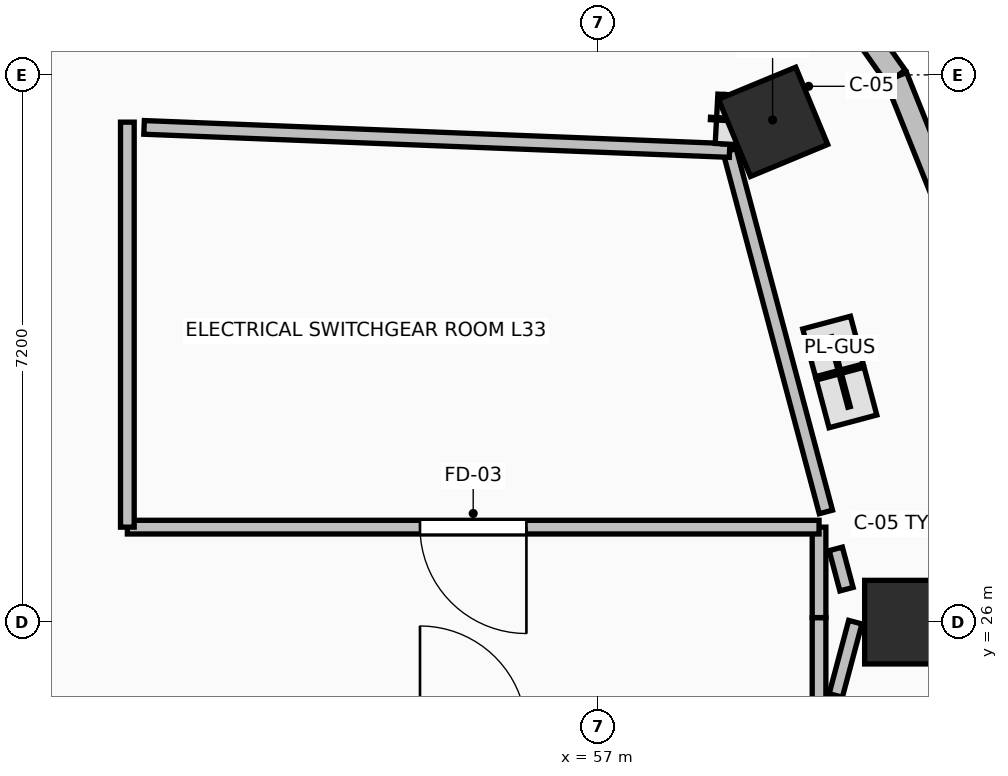
"""IFC4 building model, lengths in metres.
Left out: names, types, materials, properties, quantities, classifications, styles, units other than length and angle.
Written with IfcOpenShell. Run it as: python <this file> out.ifc"""

import sys

from ifc_helpers import new_model, si_unit, direction, frame, frame_2d, origin, origin_2d, place, context, subcontext, project, spatial, rectangle, extrude, element, fill, save


model = new_model("IFC4")
c1 = context("Model", 3, precision=1e-05, world=origin(), true_north=direction((0.0, 1.0)))
c2 = subcontext(c1, "Body", "Model", "MODEL_VIEW")
j1 = project(units=[si_unit("LENGTHUNIT", "METRE"), si_unit("PLANEANGLEUNIT", "RADIAN")], contexts=[c1])
p1 = place(None, origin())
s1 = spatial("IfcSite", under=j1, at=p1, CompositionType="ELEMENT")
p2 = place(p1, origin())
s2 = spatial("IfcBuilding", under=s1, at=p2, CompositionType="ELEMENT")
p3 = place(p2, frame((0.0, 0.0, 124.3)))
s3 = spatial("IfcBuildingStorey", under=s2, at=p3, CompositionType="ELEMENT", Elevation=124.3)
for number, where, z_axis, x_axis in (
    (1, (61.05, 26.0, 0.0), (0.0, 0.0, 1.0), (1.0, 0.0, 0.0)),
    (2, (59.295, 32.582, 0.0), (0.0, 0.0, 1.0), (0.924, 0.383, 0.0)),
):
    element("IfcColumn", number, at=place(p3, frame(where, z_axis=z_axis, x_axis=x_axis)), inside=s3, PredefinedType="COLUMN", context=c2, shape_type="SweptSolid", body=[
        extrude(rectangle(XDim=1.1, YDim=1.1, at=origin_2d()), origin(), (0.0, 0.0, 1.0), 4.8),
    ])
p4 = place(p3, frame((62.323, 29.658, 0.0), z_axis=(0.0, 0.0, 1.0), x_axis=(-0.372401154411, 0.928071861546, 0.0)))
e3 = element("IfcWall", 3, at=p4, inside=s3, PredefinedType="STANDARD", context=c2, shape_type="SweptSolid", body=[
    extrude(rectangle(XDim=3.79, YDim=0.3, at=frame_2d((1.895, 0.0))), origin(), (0.0, 0.0, 1.0), 4.54),
])
p5 = place(p3, frame((60.912, 33.175, 0.0), z_axis=(0.0, 0.0, 1.0), x_axis=(-0.577269753207, 0.816553508371, 0.0)))
e4 = element("IfcWall", 4, at=p5, inside=s3, PredefinedType="STANDARD", context=c2, shape_type="SweptSolid", body=[
    extrude(rectangle(XDim=3.97, YDim=0.3, at=frame_2d((1.985, 0.0))), origin(), (0.0, 0.0, 1.0), 4.54),
])
p6 = place(p3, frame((59.9, 24.55, 0.0), z_axis=(0.0, 0.0, 1.0), x_axis=(0.0, 1.0, 0.0)))
e5 = element("IfcWall", 5, at=p6, inside=s3, PredefinedType="PARTITIONING", context=c2, shape_type="SweptSolid", body=[
    extrude(rectangle(XDim=1.51, YDim=0.18, at=frame_2d((0.755, 0.0))), origin(), (0.0, 0.0, 1.0), 3.522),
])
p7 = place(p3, frame((59.9, 26.06, 0.0), z_axis=(0.0, 0.0, 1.0), x_axis=(0.0, 1.0, 0.0)))
e6 = element("IfcWall", 6, at=p7, inside=s3, PredefinedType="PARTITIONING", context=c2, shape_type="SweptSolid", body=[
    extrude(rectangle(XDim=1.19, YDim=0.18, at=frame_2d((0.595, 0.0))), origin(), (0.0, 0.0, 1.0), 3.522),
])
p8 = place(p3, frame((59.9, 27.25, 0.0), z_axis=(0.0, 0.0, 1.0), x_axis=(-1.0, 0.0, 0.0)))
e7 = element("IfcWall", 7, at=p8, inside=s3, PredefinedType="PARTITIONING", context=c2, shape_type="SweptSolid", body=[
    extrude(rectangle(XDim=9.1, YDim=0.18, at=frame_2d((4.55, 0.0))), origin(), (0.0, 0.0, 1.0), 3.522),
])
p9 = place(p8, frame((3.85, 0.0, 0.0)))
e8 = element("IfcOpeningElement", 8, at=p9, cuts=e7, PredefinedType="OPENING", context=c2, shape_type="SweptSolid", body=[
    extrude(rectangle(XDim=1.4, YDim=2.2, at=frame_2d((0.7, 1.1))), frame((0.0, 0.105, 0.0), z_axis=(0.0, -1.0, 0.0), x_axis=(1.0, 0.0, 0.0)), (0.0, 0.0, 1.0), 0.21),
])
p10 = place(p3, frame((50.8, 27.25, 0.0), z_axis=(0.0, 0.0, 1.0), x_axis=(0.0, 1.0, 0.0)))
e9 = element("IfcWall", 9, at=p10, inside=s3, PredefinedType="PARTITIONING", context=c2, shape_type="SweptSolid", body=[
    extrude(rectangle(XDim=5.328, YDim=0.18, at=frame_2d((2.664, 0.0))), origin(), (0.0, 0.0, 1.0), 3.522),
])
p11 = place(p3, frame((60.12, 25.036, 0.0), z_axis=(0.0, 0.0, 1.0), x_axis=(0.257418962866, 0.966299890074, 0.0)))
e10 = element("IfcWall", 10, at=p11, inside=s3, PredefinedType="PARTITIONING", context=c2, shape_type="SweptSolid", body=[
    extrude(rectangle(XDim=0.998, YDim=0.18, at=frame_2d((0.499, 0.0))), origin(), (0.0, 0.0, 1.0), 3.522),
])
p12 = place(p3, frame((60.261, 26.434, 0.0), z_axis=(0.0, 0.0, 1.0), x_axis=(-0.256859051488, 0.966448874835, 0.0)))
e11 = element("IfcWall", 11, at=p12, inside=s3, PredefinedType="PARTITIONING", context=c2, shape_type="SweptSolid", body=[
    extrude(rectangle(XDim=0.548, YDim=0.18, at=frame_2d((0.274, 0.0))), origin(), (0.0, 0.0, 1.0), 3.522),
])
p13 = place(p3, frame((59.99, 27.45, 0.0), z_axis=(0.0, 0.0, 1.0), x_axis=(-0.257483550771, 0.966282681767, 0.0)))
e12 = element("IfcWall", 12, at=p13, inside=s3, PredefinedType="PARTITIONING", context=c2, shape_type="SweptSolid", body=[
    extrude(rectangle(XDim=4.921, YDim=0.18, at=frame_2d((2.46, 0.0))), origin(), (0.0, 0.0, 1.0), 4.54),
])
p14 = place(p3, frame((58.723, 32.205, 0.0), z_axis=(0.0, 0.0, 1.0), x_axis=(-0.999222365292, 0.039429236626, 0.0)))
e13 = element("IfcWall", 13, at=p14, inside=s3, PredefinedType="PARTITIONING", context=c2, shape_type="SweptSolid", body=[
    extrude(rectangle(XDim=7.709, YDim=0.18, at=frame_2d((3.854, 0.0))), origin(), (0.0, 0.0, 1.0), 4.174),
])
p15 = place(p9, origin())
e14 = element("IfcDoor", 14, at=p15, inside=s3, OperationType="DOUBLE_SWING_LEFT", PredefinedType="DOOR", context=c2, shape_type="SweptSolid", body=[
    extrude(rectangle(XDim=1.4, YDim=2.2, at=frame_2d((0.7, 1.1))), frame((0.0, 0.025, 0.0), z_axis=(0.0, -1.0, 0.0), x_axis=(1.0, 0.0, 0.0)), (0.0, 0.0, 1.0), 0.05),
])
fill(e8, e14)
save(model, sys.argv[1])
